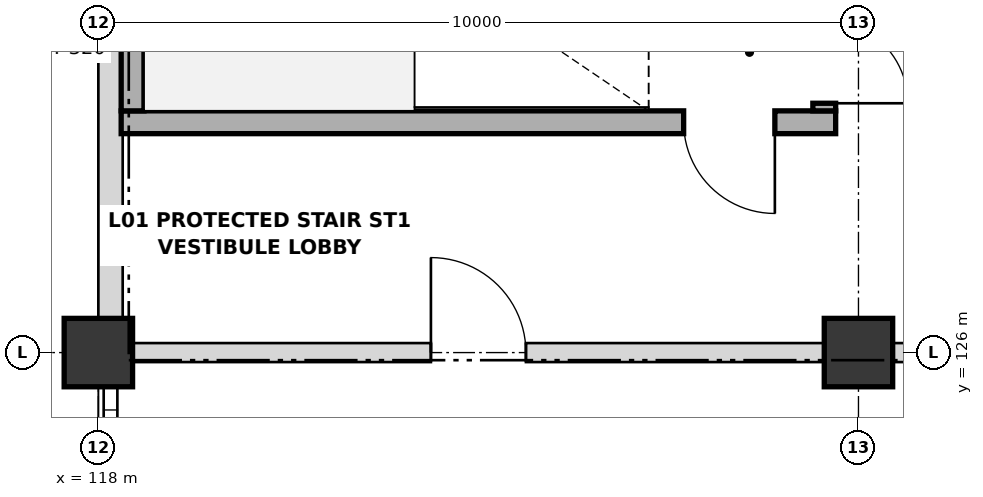
"""IFC4 building model, lengths in metres.
Left out: names, types, materials, properties, quantities, classifications, styles, units other than length and angle.
Written with IfcOpenShell. Run it as: python <this file> out.ifc"""

import sys

from ifc_helpers import new_model, si_unit, direction, frame, frame_2d, origin, origin_2d, place, context, subcontext, project, spatial, rectangle, extrude, element, fill, save


model = new_model("IFC4")
c1 = context("Model", 3, precision=1e-05, world=origin(), true_north=direction((0.0, 1.0)))
c2 = subcontext(c1, "Body", "Model", "MODEL_VIEW")
j1 = project(units=[si_unit("LENGTHUNIT", "METRE"), si_unit("PLANEANGLEUNIT", "RADIAN")], contexts=[c1])
p1 = place(None, origin())
s1 = spatial("IfcSite", under=j1, at=p1, CompositionType="ELEMENT")
p2 = place(p1, origin())
s2 = spatial("IfcBuilding", under=s1, at=p2, CompositionType="ELEMENT")
p3 = place(p2, frame((0.0, 0.0, 5.4)))
s3 = spatial("IfcBuildingStorey", under=s2, at=p3, CompositionType="ELEMENT", Elevation=5.4)
for number, where, z_axis, x_axis in (
    (1, (118.0, 126.0, 0.0), (0.0, 0.0, 1.0), (1.0, 0.0, 0.0)),
    (2, (128.0, 126.0, 0.0), (0.0, 0.0, 1.0), (1.0, 0.0, 0.0)),
):
    element("IfcColumn", number, at=place(p3, frame(where, z_axis=z_axis, x_axis=x_axis)), inside=s3, PredefinedType="COLUMN", context=c2, shape_type="SweptSolid", body=[
        extrude(rectangle(XDim=0.9, YDim=0.9, at=origin_2d()), origin(), (0.0, 0.0, 1.0), 4.2),
    ])
p4 = place(p3, frame((118.16, 126.445, 0.0), z_axis=(0.0, 0.0, 1.0), x_axis=(0.0, 1.0, 0.0)))
e3 = element("IfcWall", 3, at=p4, inside=s3, PredefinedType="SOLIDWALL", context=c2, shape_type="SweptSolid", body=[
    extrude(rectangle(XDim=7.11, YDim=0.32, at=frame_2d((3.555, 0.0))), origin(), (0.0, 0.0, 1.0), 3.218),
])
p5 = place(p3, frame((127.7, 129.03, 0.0), z_axis=(0.0, 0.0, 1.0), x_axis=(-1.0, 0.0, 0.0)))
e4 = element("IfcWall", 4, at=p5, inside=s3, PredefinedType="SHEAR", context=c2, shape_type="SweptSolid", body=[
    extrude(rectangle(XDim=9.4, YDim=0.3, at=frame_2d((4.7, 0.0))), origin(), (0.0, 0.0, 1.0), 4.2),
])
p6 = place(p5, frame((0.8, 0.0, 0.0)))
e5 = element("IfcOpeningElement", 5, at=p6, cuts=e4, PredefinedType="OPENING", context=c2, shape_type="SweptSolid", body=[
    extrude(rectangle(XDim=1.2, YDim=2.15, at=frame_2d((0.6, 1.075))), frame((0.0, 0.16, 0.0), z_axis=(0.0, -1.0, 0.0), x_axis=(1.0, 0.0, 0.0)), (0.0, 0.0, 1.0), 0.32),
])
p7 = place(p3, frame((127.55, 133.68, 0.0), z_axis=(0.0, 0.0, 1.0), x_axis=(0.0, -1.0, 0.0)))
e6 = element("IfcWall", 6, at=p7, inside=s3, PredefinedType="SHEAR", context=c2, shape_type="SweptSolid", body=[
    extrude(rectangle(XDim=4.5, YDim=0.3, at=frame_2d((2.25, 0.0))), origin(), (0.0, 0.0, 1.0), 4.2),
])
p8 = place(p7, frame((3.3, 0.0, 0.0)))
e7 = element("IfcOpeningElement", 7, at=p8, cuts=e6, PredefinedType="OPENING", context=c2, shape_type="SweptSolid", body=[
    extrude(rectangle(XDim=1.1, YDim=2.15, at=frame_2d((0.55, 1.075))), frame((0.0, 0.16, 0.0), z_axis=(0.0, -1.0, 0.0), x_axis=(1.0, 0.0, 0.0)), (0.0, 0.0, 1.0), 0.32),
])
p9 = place(p3, frame((118.45, 129.18, 0.0), z_axis=(0.0, 0.0, 1.0), x_axis=(0.0, 1.0, 0.0)))
e8 = element("IfcWall", 8, at=p9, inside=s3, PredefinedType="SHEAR", context=c2, shape_type="SweptSolid", body=[
    extrude(rectangle(XDim=4.5, YDim=0.3, at=frame_2d((2.25, 0.0))), origin(), (0.0, 0.0, 1.0), 4.2),
])
p10 = place(p3, frame((118.455, 126.0, 0.0), z_axis=(0.0, 0.0, 1.0), x_axis=(1.0, 0.0, 0.0)))
e9 = element("IfcWall", 9, at=p10, inside=s3, PredefinedType="PARTITIONING", context=c2, shape_type="SweptSolid", body=[
    extrude(rectangle(XDim=9.09, YDim=0.25, at=frame_2d((4.545, 0.0))), origin(), (0.0, 0.0, 1.0), 3.018),
])
p11 = place(p10, frame((3.92, 0.0, 0.0)))
e10 = element("IfcOpeningElement", 10, at=p11, cuts=e9, PredefinedType="OPENING", context=c2, shape_type="SweptSolid", body=[
    extrude(rectangle(XDim=1.25, YDim=2.15, at=frame_2d((0.625, 1.075))), frame((0.0, 0.135, 0.0), z_axis=(0.0, -1.0, 0.0), x_axis=(1.0, 0.0, 0.0)), (0.0, 0.0, 1.0), 0.27),
])
p12 = place(p3, frame((128.455, 126.0, 0.0), z_axis=(0.0, 0.0, 1.0), x_axis=(1.0, 0.0, 0.0)))
e11 = element("IfcWall", 11, at=p12, inside=s3, PredefinedType="PARTITIONING", context=c2, shape_type="SweptSolid", body=[
    extrude(rectangle(XDim=9.09, YDim=0.25, at=frame_2d((4.545, 0.0))), origin(), (0.0, 0.0, 1.0), 3.018),
])
p13 = place(p12, frame((1.72, 0.0, 0.0)))
e12 = element("IfcOpeningElement", 12, at=p13, cuts=e11, PredefinedType="OPENING", context=c2, shape_type="SweptSolid", body=[
    extrude(rectangle(XDim=1.25, YDim=2.15, at=frame_2d((0.625, 1.075))), frame((0.0, 0.135, 0.0), z_axis=(0.0, -1.0, 0.0), x_axis=(1.0, 0.0, 0.0)), (0.0, 0.0, 1.0), 0.27),
])
p14 = place(p12, frame((6.195, 0.0, 0.0)))
e13 = element("IfcOpeningElement", 13, at=p14, cuts=e11, PredefinedType="OPENING", context=c2, shape_type="SweptSolid", body=[
    extrude(rectangle(XDim=1.1, YDim=2.15, at=frame_2d((0.55, 1.075))), frame((0.0, 0.135, 0.0), z_axis=(0.0, -1.0, 0.0), x_axis=(1.0, 0.0, 0.0)), (0.0, 0.0, 1.0), 0.27),
])
p15 = place(p6, origin())
e14 = element("IfcDoor", 14, at=p15, inside=s3, OperationType="SINGLE_SWING_LEFT", PredefinedType="DOOR", context=c2, shape_type="SweptSolid", body=[
    extrude(rectangle(XDim=1.2, YDim=2.15, at=frame_2d((0.6, 1.075))), frame((0.0, 0.025, 0.0), z_axis=(0.0, -1.0, 0.0), x_axis=(1.0, 0.0, 0.0)), (0.0, 0.0, 1.0), 0.05),
])
fill(e5, e14)
p16 = place(p8, origin())
e15 = element("IfcDoor", 15, at=p16, inside=s3, OperationType="SINGLE_SWING_RIGHT", PredefinedType="DOOR", context=c2, shape_type="SweptSolid", body=[
    extrude(rectangle(XDim=1.1, YDim=2.15, at=frame_2d((0.55, 1.075))), frame((0.0, 0.025, 0.0), z_axis=(0.0, -1.0, 0.0), x_axis=(1.0, 0.0, 0.0)), (0.0, 0.0, 1.0), 0.05),
])
fill(e7, e15)
p17 = place(p11, origin())
e16 = element("IfcDoor", 16, at=p17, inside=s3, OperationType="SINGLE_SWING_LEFT", PredefinedType="DOOR", context=c2, shape_type="SweptSolid", body=[
    extrude(rectangle(XDim=1.25, YDim=2.15, at=frame_2d((0.625, 1.075))), frame((0.0, 0.025, 0.0), z_axis=(0.0, -1.0, 0.0), x_axis=(1.0, 0.0, 0.0)), (0.0, 0.0, 1.0), 0.05),
])
fill(e10, e16)
save(model, sys.argv[1])
